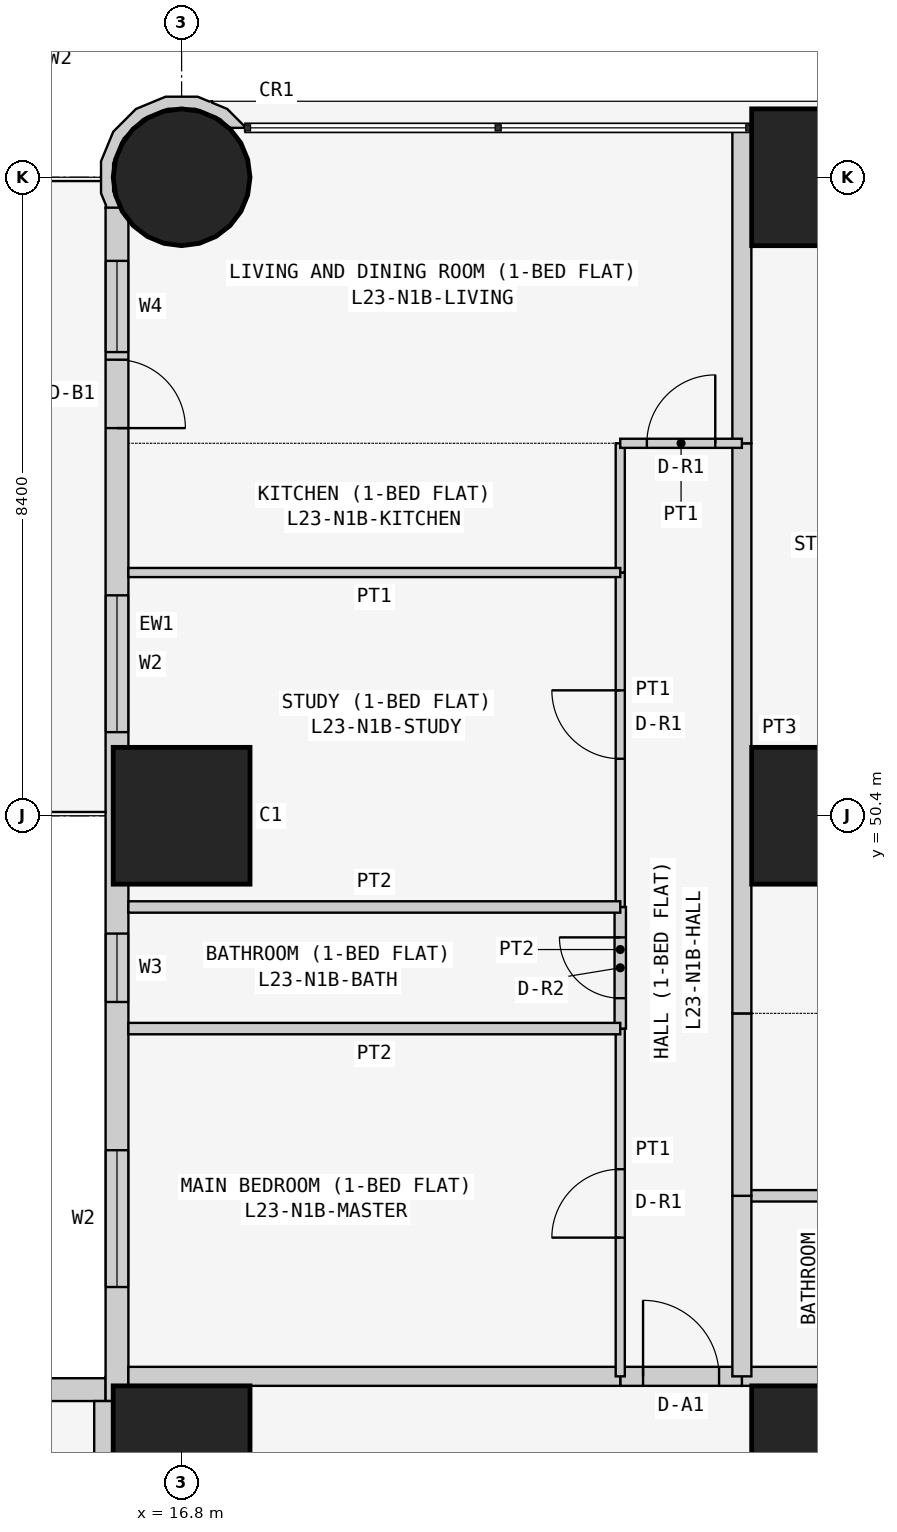
"""IFC4 building model, lengths in metres.
Left out: names, types, materials, properties, quantities, classifications, styles, units other than length and angle.
Written with IfcOpenShell. Run it as: python <this file> out.ifc"""

import sys

from ifc_helpers import new_model, si_unit, direction, frame, frame_2d, origin, origin_2d, place, context, subcontext, project, spatial, polyline, rectangle, circle, outline, extrude, element, fill, save


model = new_model("IFC4")
c1 = context("Model", 3, precision=1e-05, world=origin(), true_north=direction((0.0, 1.0)))
c2 = subcontext(c1, "Body", "Model", "MODEL_VIEW")
j1 = project(units=[si_unit("LENGTHUNIT", "METRE"), si_unit("PLANEANGLEUNIT", "RADIAN")], contexts=[c1])
p1 = place(None, origin())
s1 = spatial("IfcSite", under=j1, at=p1, CompositionType="ELEMENT")
p2 = place(p1, origin())
s2 = spatial("IfcBuilding", under=s1, at=p2, CompositionType="ELEMENT")
p3 = place(p2, frame((0.0, 0.0, 92.1)))
s3 = spatial("IfcBuildingStorey", under=s2, at=p3, CompositionType="ELEMENT", Elevation=92.1)
for number, where, z_axis, x_axis in (
    (1, (16.8, 42.0, 0.0), (0.0, 0.0, 1.0), (1.0, 0.0, 0.0)),
    (2, (16.8, 50.4, 0.0), (0.0, 0.0, 1.0), (1.0, 0.0, 0.0)),
):
    element("IfcColumn", number, at=place(p3, frame(where, z_axis=z_axis, x_axis=x_axis)), inside=s3, PredefinedType="COLUMN", context=c2, shape_type="SweptSolid", body=[
        extrude(rectangle(XDim=1.8, YDim=1.8, at=origin_2d()), origin(), (0.0, 0.0, 1.0), 3.6),
    ])
p4 = place(p3, frame((16.8, 58.8, 0.0), z_axis=(0.0, 0.0, 1.0), x_axis=(1.0, 0.0, 0.0)))
e3 = element("IfcColumn", 3, at=p4, inside=s3, PredefinedType="COLUMN", context=c2, shape_type="SweptSolid", body=[
    extrude(circle(Radius=0.9, at=origin_2d()), origin(), (0.0, 0.0, 1.0), 3.6),
])
for number, where, z_axis, x_axis in (
    (4, (25.2, 42.0, 0.0), (0.0, 0.0, 1.0), (1.0, 0.0, 0.0)),
    (5, (25.2, 50.4, 0.0), (0.0, 0.0, 1.0), (1.0, 0.0, 0.0)),
    (6, (25.2, 58.8, 0.0), (0.0, 0.0, 1.0), (1.0, 0.0, 0.0)),
):
    element("IfcColumn", number, at=place(p3, frame(where, z_axis=z_axis, x_axis=x_axis)), inside=s3, PredefinedType="COLUMN", context=c2, shape_type="SweptSolid", body=[
        extrude(rectangle(XDim=1.8, YDim=1.8, at=origin_2d()), origin(), (0.0, 0.0, 1.0), 3.6),
    ])
p5 = place(p3, frame((15.8, 42.85, 0.0), z_axis=(0.0, 0.0, 1.0), x_axis=(-1.0, 0.0, 0.0)))
e7 = element("IfcWall", 7, at=p5, inside=s3, PredefinedType="SOLIDWALL", context=c2, shape_type="SweptSolid", body=[
    extrude(rectangle(XDim=15.4, YDim=0.3, at=frame_2d((7.7, 0.0))), origin(), (0.0, 0.0, 1.0), 3.45),
])
p6 = place(p5, frame((1.2, 0.0, 0.9)))
e8 = element("IfcOpeningElement", 8, at=p6, cuts=e7, PredefinedType="OPENING", context=c2, shape_type="SweptSolid", body=[
    extrude(rectangle(XDim=1.8, YDim=1.5, at=frame_2d((0.9, 0.75))), frame((0.0, 0.16, 0.0), z_axis=(0.0, -1.0, 0.0), x_axis=(1.0, 0.0, 0.0)), (0.0, 0.0, 1.0), 0.32),
])
p7 = place(p5, frame((4.95, 0.0, 1.5)))
e9 = element("IfcOpeningElement", 9, at=p7, cuts=e7, PredefinedType="OPENING", context=c2, shape_type="SweptSolid", body=[
    extrude(rectangle(XDim=0.9, YDim=0.7, at=frame_2d((0.45, 0.35))), frame((0.0, 0.16, 0.0), z_axis=(0.0, -1.0, 0.0), x_axis=(1.0, 0.0, 0.0)), (0.0, 0.0, 1.0), 0.32),
])
p8 = place(p5, frame((8.5, 0.0, 0.9)))
e10 = element("IfcOpeningElement", 10, at=p8, cuts=e7, PredefinedType="OPENING", context=c2, shape_type="SweptSolid", body=[
    extrude(rectangle(XDim=1.8, YDim=1.5, at=frame_2d((0.9, 0.75))), frame((0.0, 0.16, 0.0), z_axis=(0.0, -1.0, 0.0), x_axis=(1.0, 0.0, 0.0)), (0.0, 0.0, 1.0), 0.32),
])
p9 = place(p5, frame((12.5, 0.0, 0.0)))
e11 = element("IfcOpeningElement", 11, at=p9, cuts=e7, PredefinedType="OPENING", context=c2, shape_type="SweptSolid", body=[
    extrude(rectangle(XDim=0.9, YDim=2.4, at=frame_2d((0.45, 1.2))), frame((0.0, 0.16, 0.0), z_axis=(0.0, -1.0, 0.0), x_axis=(1.0, 0.0, 0.0)), (0.0, 0.0, 1.0), 0.32),
])
p10 = place(p5, frame((13.5, 0.0, 0.9)))
e12 = element("IfcOpeningElement", 12, at=p10, cuts=e7, PredefinedType="OPENING", context=c2, shape_type="SweptSolid", body=[
    extrude(rectangle(XDim=1.2, YDim=1.5, at=frame_2d((0.6, 0.75))), frame((0.0, 0.16, 0.0), z_axis=(0.0, -1.0, 0.0), x_axis=(1.0, 0.0, 0.0)), (0.0, 0.0, 1.0), 0.32),
])
p11 = place(p3, frame((15.95, 58.4, 0.0), z_axis=(0.0, 0.0, 1.0), x_axis=(0.0, -1.0, 0.0)))
e13 = element("IfcWall", 13, at=p11, inside=s3, PredefinedType="SOLIDWALL", context=c2, shape_type="SweptSolid", body=[
    extrude(rectangle(XDim=15.7, YDim=0.3, at=frame_2d((7.85, 0.0))), origin(), (0.0, 0.0, 1.0), 3.45),
])
p12 = place(p11, frame((12.4, 0.0, 0.9)))
e14 = element("IfcOpeningElement", 14, at=p12, cuts=e13, PredefinedType="OPENING", context=c2, shape_type="SweptSolid", body=[
    extrude(rectangle(XDim=1.8, YDim=1.5, at=frame_2d((0.9, 0.75))), frame((0.0, 0.16, 0.0), z_axis=(0.0, -1.0, 0.0), x_axis=(1.0, 0.0, 0.0)), (0.0, 0.0, 1.0), 0.32),
])
p13 = place(p11, frame((9.55, 0.0, 1.5)))
e15 = element("IfcOpeningElement", 15, at=p13, cuts=e13, PredefinedType="OPENING", context=c2, shape_type="SweptSolid", body=[
    extrude(rectangle(XDim=0.9, YDim=0.7, at=frame_2d((0.45, 0.35))), frame((0.0, 0.16, 0.0), z_axis=(0.0, -1.0, 0.0), x_axis=(1.0, 0.0, 0.0)), (0.0, 0.0, 1.0), 0.32),
])
p14 = place(p11, frame((5.1, 0.0, 0.9)))
e16 = element("IfcOpeningElement", 16, at=p14, cuts=e13, PredefinedType="OPENING", context=c2, shape_type="SweptSolid", body=[
    extrude(rectangle(XDim=1.8, YDim=1.5, at=frame_2d((0.9, 0.75))), frame((0.0, 0.16, 0.0), z_axis=(0.0, -1.0, 0.0), x_axis=(1.0, 0.0, 0.0)), (0.0, 0.0, 1.0), 0.32),
])
p15 = place(p11, frame((2.0, 0.0, 0.0)))
e17 = element("IfcOpeningElement", 17, at=p15, cuts=e13, PredefinedType="OPENING", context=c2, shape_type="SweptSolid", body=[
    extrude(rectangle(XDim=0.9, YDim=2.4, at=frame_2d((0.45, 1.2))), frame((0.0, 0.16, 0.0), z_axis=(0.0, -1.0, 0.0), x_axis=(1.0, 0.0, 0.0)), (0.0, 0.0, 1.0), 0.32),
])
p16 = place(p11, frame((0.7, 0.0, 0.9)))
e18 = element("IfcOpeningElement", 18, at=p16, cuts=e13, PredefinedType="OPENING", context=c2, shape_type="SweptSolid", body=[
    extrude(rectangle(XDim=1.2, YDim=1.5, at=frame_2d((0.6, 0.75))), frame((0.0, 0.16, 0.0), z_axis=(0.0, -1.0, 0.0), x_axis=(1.0, 0.0, 0.0)), (0.0, 0.0, 1.0), 0.32),
])
p17 = place(p3, frame((17.567, 59.411, 0.0), z_axis=(0.0, 0.0, 1.0), x_axis=(-0.377204953059, 0.926129809145, 0.0)))
e19 = element("IfcWall", 19, at=p17, inside=s3, PredefinedType="SOLIDWALL", context=c2, shape_type="SweptSolid", body=[
    extrude(outline(polyline([(-0.27, 2.017), (-0.37, 1.841), (-0.102, 1.842), (0.23, 1.707), (0.484, 1.455), (0.624, 1.125), (0.626, 0.766), (0.491, 0.434), (0.239, 0.18), (0.09, 0.117), (0.011, -0.078), (0.024, -0.083), (0.329, 0.045), (0.48, 0.198), (0.499, 0.193), (0.508, 0.225), (0.626, 0.345), (0.785, 0.736), (0.782, 1.157), (0.619, 1.546), (0.319, 1.842), (-0.072, 2.002), (-0.24, 2.0), (-0.27, 2.017)])), origin(), (0.0, 0.0, 1.0), 3.45),
])
p18 = place(p3, frame((24.171, 43.025, 0.0), z_axis=(0.0, 0.0, 1.0), x_axis=(1.0, 0.0, 0.0)))
e20 = element("IfcWall", 20, at=p18, inside=s3, PredefinedType="PARTITIONING", context=c2, shape_type="SweptSolid", body=[
    extrude(rectangle(XDim=2.629, YDim=0.25, at=frame_2d((1.314, 0.0))), origin(), (0.0, 0.0, 1.0), 3.45),
])
p19 = place(p3, frame((22.571, 43.025, 0.0), z_axis=(0.0, 0.0, 1.0), x_axis=(1.0, 0.0, 0.0)))
e21 = element("IfcWall", 21, at=p19, inside=s3, PredefinedType="PARTITIONING", context=c2, shape_type="SweptSolid", body=[
    extrude(rectangle(XDim=1.6, YDim=0.25, at=frame_2d((0.8, 0.0))), origin(), (0.0, 0.0, 1.0), 3.45),
])
p20 = place(p19, frame((0.3, 0.0, 0.0)))
e22 = element("IfcOpeningElement", 22, at=p20, cuts=e21, PredefinedType="OPENING", context=c2, shape_type="SweptSolid", body=[
    extrude(rectangle(XDim=1.0, YDim=2.1, at=frame_2d((0.5, 1.05))), frame((0.0, 0.135, 0.0), z_axis=(0.0, -1.0, 0.0), x_axis=(1.0, 0.0, 0.0)), (0.0, 0.0, 1.0), 0.27),
])
p21 = place(p3, frame((16.1, 43.025, 0.0), z_axis=(0.0, 0.0, 1.0), x_axis=(1.0, 0.0, 0.0)))
e23 = element("IfcWall", 23, at=p21, inside=s3, PredefinedType="PARTITIONING", context=c2, shape_type="SweptSolid", body=[
    extrude(rectangle(XDim=6.471, YDim=0.25, at=frame_2d((3.235, 0.0))), origin(), (0.0, 0.0, 1.0), 3.45),
])
p22 = place(p3, frame((15.775, 35.829, 0.0), z_axis=(0.0, 0.0, 1.0), x_axis=(0.0, 1.0, 0.0)))
e24 = element("IfcWall", 24, at=p22, inside=s3, PredefinedType="PARTITIONING", context=c2, shape_type="SweptSolid", body=[
    extrude(rectangle(XDim=6.871, YDim=0.25, at=frame_2d((3.436, 0.0))), origin(), (0.0, 0.0, 1.0), 3.45),
])
p23 = place(p3, frame((26.8, 45.4, 0.0), z_axis=(0.0, 0.0, 1.0), x_axis=(-1.0, 0.0, 0.0)))
e25 = element("IfcWall", 25, at=p23, inside=s3, PredefinedType="PARTITIONING", context=c2, shape_type="SweptSolid", body=[
    extrude(rectangle(XDim=2.629, YDim=0.15, at=frame_2d((1.314, 0.0))), origin(), (0.0, 0.0, 1.0), 3.45),
])
p24 = place(p3, frame((24.171, 45.4, 0.0), z_axis=(0.0, 0.0, 1.0), x_axis=(0.0, -1.0, 0.0)))
e26 = element("IfcWall", 26, at=p24, inside=s3, PredefinedType="PARTITIONING", context=c2, shape_type="SweptSolid", body=[
    extrude(rectangle(XDim=2.375, YDim=0.25, at=frame_2d((1.188, 0.0))), origin(), (0.0, 0.0, 1.0), 3.45),
])
p25 = place(p3, frame((24.171, 47.8, 0.0), z_axis=(0.0, 0.0, 1.0), x_axis=(0.0, -1.0, 0.0)))
e27 = element("IfcWall", 27, at=p25, inside=s3, PredefinedType="PARTITIONING", context=c2, shape_type="SweptSolid", body=[
    extrude(rectangle(XDim=2.4, YDim=0.25, at=frame_2d((1.2, 0.0))), origin(), (0.0, 0.0, 1.0), 3.45),
])
p26 = place(p3, frame((24.171, 55.3, 0.0), z_axis=(0.0, 0.0, 1.0), x_axis=(0.0, -1.0, 0.0)))
e28 = element("IfcWall", 28, at=p26, inside=s3, PredefinedType="PARTITIONING", context=c2, shape_type="SweptSolid", body=[
    extrude(rectangle(XDim=7.5, YDim=0.25, at=frame_2d((3.75, 0.0))), origin(), (0.0, 0.0, 1.0), 3.45),
])
p27 = place(p3, frame((24.171, 59.45, 0.0), z_axis=(0.0, 0.0, 1.0), x_axis=(0.0, -1.0, 0.0)))
e29 = element("IfcWall", 29, at=p27, inside=s3, PredefinedType="PARTITIONING", context=c2, shape_type="SweptSolid", body=[
    extrude(rectangle(XDim=4.15, YDim=0.25, at=frame_2d((2.075, 0.0))), origin(), (0.0, 0.0, 1.0), 3.45),
])
p28 = place(p3, frame((22.571, 47.6, 0.0), z_axis=(0.0, 0.0, 1.0), x_axis=(0.0, -1.0, 0.0)))
e30 = element("IfcWall", 30, at=p28, inside=s3, PredefinedType="PARTITIONING", context=c2, shape_type="SweptSolid", body=[
    extrude(rectangle(XDim=4.575, YDim=0.12, at=frame_2d((2.288, 0.0))), origin(), (0.0, 0.0, 1.0), 3.45),
])
p29 = place(p28, frame((1.85, 0.0, 0.0)))
e31 = element("IfcOpeningElement", 31, at=p29, cuts=e30, PredefinedType="OPENING", context=c2, shape_type="SweptSolid", body=[
    extrude(rectangle(XDim=0.9, YDim=2.1, at=frame_2d((0.45, 1.05))), frame((0.0, 0.07, 0.0), z_axis=(0.0, -1.0, 0.0), x_axis=(1.0, 0.0, 0.0)), (0.0, 0.0, 1.0), 0.14),
])
p30 = place(p3, frame((22.571, 49.2, 0.0), z_axis=(0.0, 0.0, 1.0), x_axis=(0.0, -1.0, 0.0)))
e32 = element("IfcWall", 32, at=p30, inside=s3, PredefinedType="PARTITIONING", context=c2, shape_type="SweptSolid", body=[
    extrude(rectangle(XDim=1.6, YDim=0.15, at=frame_2d((0.8, 0.0))), origin(), (0.0, 0.0, 1.0), 3.45),
])
p31 = place(p30, frame((0.4, 0.0, 0.0)))
e33 = element("IfcOpeningElement", 33, at=p31, cuts=e32, PredefinedType="OPENING", context=c2, shape_type="SweptSolid", body=[
    extrude(rectangle(XDim=0.8, YDim=2.1, at=frame_2d((0.4, 1.05))), frame((0.0, 0.085, 0.0), z_axis=(0.0, -1.0, 0.0), x_axis=(1.0, 0.0, 0.0)), (0.0, 0.0, 1.0), 0.17),
])
p32 = place(p3, frame((22.571, 53.6, 0.0), z_axis=(0.0, 0.0, 1.0), x_axis=(0.0, -1.0, 0.0)))
e34 = element("IfcWall", 34, at=p32, inside=s3, PredefinedType="PARTITIONING", context=c2, shape_type="SweptSolid", body=[
    extrude(rectangle(XDim=4.4, YDim=0.12, at=frame_2d((2.2, 0.0))), origin(), (0.0, 0.0, 1.0), 3.45),
])
p33 = place(p32, frame((1.55, 0.0, 0.0)))
e35 = element("IfcOpeningElement", 35, at=p33, cuts=e34, PredefinedType="OPENING", context=c2, shape_type="SweptSolid", body=[
    extrude(rectangle(XDim=0.9, YDim=2.1, at=frame_2d((0.45, 1.05))), frame((0.0, 0.07, 0.0), z_axis=(0.0, -1.0, 0.0), x_axis=(1.0, 0.0, 0.0)), (0.0, 0.0, 1.0), 0.14),
])
p34 = place(p3, frame((22.571, 55.3, 0.0), z_axis=(0.0, 0.0, 1.0), x_axis=(0.0, -1.0, 0.0)))
e36 = element("IfcWall", 36, at=p34, inside=s3, PredefinedType="PARTITIONING", context=c2, shape_type="SweptSolid", body=[
    extrude(rectangle(XDim=1.7, YDim=0.12, at=frame_2d((0.85, 0.0))), origin(), (0.0, 0.0, 1.0), 3.45),
])
p35 = place(p3, frame((24.171, 55.3, 0.0), z_axis=(0.0, 0.0, 1.0), x_axis=(-1.0, 0.0, 0.0)))
e37 = element("IfcWall", 37, at=p35, inside=s3, PredefinedType="PARTITIONING", context=c2, shape_type="SweptSolid", body=[
    extrude(rectangle(XDim=1.6, YDim=0.12, at=frame_2d((0.8, 0.0))), origin(), (0.0, 0.0, 1.0), 3.45),
])
p36 = place(p35, frame((0.35, 0.0, 0.0)))
e38 = element("IfcOpeningElement", 38, at=p36, cuts=e37, PredefinedType="OPENING", context=c2, shape_type="SweptSolid", body=[
    extrude(rectangle(XDim=0.9, YDim=2.1, at=frame_2d((0.45, 1.05))), frame((0.0, 0.07, 0.0), z_axis=(0.0, -1.0, 0.0), x_axis=(1.0, 0.0, 0.0)), (0.0, 0.0, 1.0), 0.14),
])
for number, where, z_axis, x_axis in (
    (39, (22.571, 47.6, 0.0), (0.0, 0.0, 1.0), (-1.0, 0.0, 0.0)),
    (40, (22.571, 49.2, 0.0), (0.0, 0.0, 1.0), (-1.0, 0.0, 0.0)),
):
    element("IfcWall", number, at=place(p3, frame(where, z_axis=z_axis, x_axis=x_axis)), inside=s3, PredefinedType="PARTITIONING", context=c2, shape_type="SweptSolid", body=[
        extrude(rectangle(XDim=6.471, YDim=0.15, at=frame_2d((3.235, 0.0))), origin(), (0.0, 0.0, 1.0), 3.45),
    ])
p37 = place(p3, frame((22.571, 53.6, 0.0), z_axis=(0.0, 0.0, 1.0), x_axis=(-1.0, 0.0, 0.0)))
e41 = element("IfcWall", 41, at=p37, inside=s3, PredefinedType="PARTITIONING", context=c2, shape_type="SweptSolid", body=[
    extrude(rectangle(XDim=6.471, YDim=0.12, at=frame_2d((3.235, 0.0))), origin(), (0.0, 0.0, 1.0), 3.45),
])
p38 = place(p12, origin())
e42 = element("IfcWindow", 42, at=p38, inside=s3, PartitioningType="SINGLE_PANEL", PredefinedType="WINDOW", context=c2, shape_type="SweptSolid", body=[
    extrude(rectangle(XDim=1.8, YDim=1.5, at=frame_2d((0.9, 0.75))), frame((0.0, 0.03, 0.0), z_axis=(0.0, -1.0, 0.0), x_axis=(1.0, 0.0, 0.0)), (0.0, 0.0, 1.0), 0.06),
])
fill(e14, e42)
p39 = place(p13, origin())
e43 = element("IfcWindow", 43, at=p39, inside=s3, PartitioningType="SINGLE_PANEL", PredefinedType="WINDOW", context=c2, shape_type="SweptSolid", body=[
    extrude(rectangle(XDim=0.9, YDim=0.7, at=frame_2d((0.45, 0.35))), frame((0.0, 0.03, 0.0), z_axis=(0.0, -1.0, 0.0), x_axis=(1.0, 0.0, 0.0)), (0.0, 0.0, 1.0), 0.06),
])
fill(e15, e43)
p40 = place(p14, origin())
e44 = element("IfcWindow", 44, at=p40, inside=s3, PartitioningType="SINGLE_PANEL", PredefinedType="WINDOW", context=c2, shape_type="SweptSolid", body=[
    extrude(rectangle(XDim=1.8, YDim=1.5, at=frame_2d((0.9, 0.75))), frame((0.0, 0.03, 0.0), z_axis=(0.0, -1.0, 0.0), x_axis=(1.0, 0.0, 0.0)), (0.0, 0.0, 1.0), 0.06),
])
fill(e16, e44)
p41 = place(p15, origin())
e45 = element("IfcDoor", 45, at=p41, inside=s3, OperationType="SINGLE_SWING_RIGHT", PredefinedType="DOOR", context=c2, shape_type="SweptSolid", body=[
    extrude(rectangle(XDim=0.9, YDim=2.4, at=frame_2d((0.45, 1.2))), frame((0.0, 0.025, 0.0), z_axis=(0.0, -1.0, 0.0), x_axis=(1.0, 0.0, 0.0)), (0.0, 0.0, 1.0), 0.05),
])
fill(e17, e45)
p42 = place(p16, origin())
e46 = element("IfcWindow", 46, at=p42, inside=s3, PartitioningType="SINGLE_PANEL", PredefinedType="WINDOW", context=c2, shape_type="SweptSolid", body=[
    extrude(rectangle(XDim=1.2, YDim=1.5, at=frame_2d((0.6, 0.75))), frame((0.0, 0.03, 0.0), z_axis=(0.0, -1.0, 0.0), x_axis=(1.0, 0.0, 0.0)), (0.0, 0.0, 1.0), 0.06),
])
fill(e18, e46)
p43 = place(p20, origin())
e47 = element("IfcDoor", 47, at=p43, inside=s3, OperationType="SINGLE_SWING_LEFT", PredefinedType="DOOR", context=c2, shape_type="SweptSolid", body=[
    extrude(rectangle(XDim=1.0, YDim=2.1, at=frame_2d((0.5, 1.05))), frame((0.0, 0.025, 0.0), z_axis=(0.0, -1.0, 0.0), x_axis=(1.0, 0.0, 0.0)), (0.0, 0.0, 1.0), 0.05),
])
fill(e22, e47)
p44 = place(p29, frame((0.9, 0.0, 0.0), z_axis=(0.0, 0.0, 1.0), x_axis=(-1.0, 0.0, 0.0)))
e48 = element("IfcDoor", 48, at=p44, inside=s3, OperationType="SINGLE_SWING_LEFT", PredefinedType="DOOR", context=c2, shape_type="SweptSolid", body=[
    extrude(rectangle(XDim=0.9, YDim=2.1, at=frame_2d((0.45, 1.05))), frame((0.0, 0.025, 0.0), z_axis=(0.0, -1.0, 0.0), x_axis=(1.0, 0.0, 0.0)), (0.0, 0.0, 1.0), 0.05),
])
fill(e31, e48)
p45 = place(p31, frame((0.8, 0.0, 0.0), z_axis=(0.0, 0.0, 1.0), x_axis=(-1.0, 0.0, 0.0)))
e49 = element("IfcDoor", 49, at=p45, inside=s3, OperationType="SINGLE_SWING_RIGHT", PredefinedType="DOOR", context=c2, shape_type="SweptSolid", body=[
    extrude(rectangle(XDim=0.8, YDim=2.1, at=frame_2d((0.4, 1.05))), frame((0.0, 0.025, 0.0), z_axis=(0.0, -1.0, 0.0), x_axis=(1.0, 0.0, 0.0)), (0.0, 0.0, 1.0), 0.05),
])
fill(e33, e49)
p46 = place(p33, frame((0.9, 0.0, 0.0), z_axis=(0.0, 0.0, 1.0), x_axis=(-1.0, 0.0, 0.0)))
e50 = element("IfcDoor", 50, at=p46, inside=s3, OperationType="SINGLE_SWING_RIGHT", PredefinedType="DOOR", context=c2, shape_type="SweptSolid", body=[
    extrude(rectangle(XDim=0.9, YDim=2.1, at=frame_2d((0.45, 1.05))), frame((0.0, 0.025, 0.0), z_axis=(0.0, -1.0, 0.0), x_axis=(1.0, 0.0, 0.0)), (0.0, 0.0, 1.0), 0.05),
])
fill(e35, e50)
p47 = place(p36, frame((0.9, 0.0, 0.0), z_axis=(0.0, 0.0, 1.0), x_axis=(-1.0, 0.0, 0.0)))
e51 = element("IfcDoor", 51, at=p47, inside=s3, OperationType="SINGLE_SWING_RIGHT", PredefinedType="DOOR", context=c2, shape_type="SweptSolid", body=[
    extrude(rectangle(XDim=0.9, YDim=2.1, at=frame_2d((0.45, 1.05))), frame((0.0, 0.025, 0.0), z_axis=(0.0, -1.0, 0.0), x_axis=(1.0, 0.0, 0.0)), (0.0, 0.0, 1.0), 0.05),
])
fill(e38, e51)
save(model, sys.argv[1])
